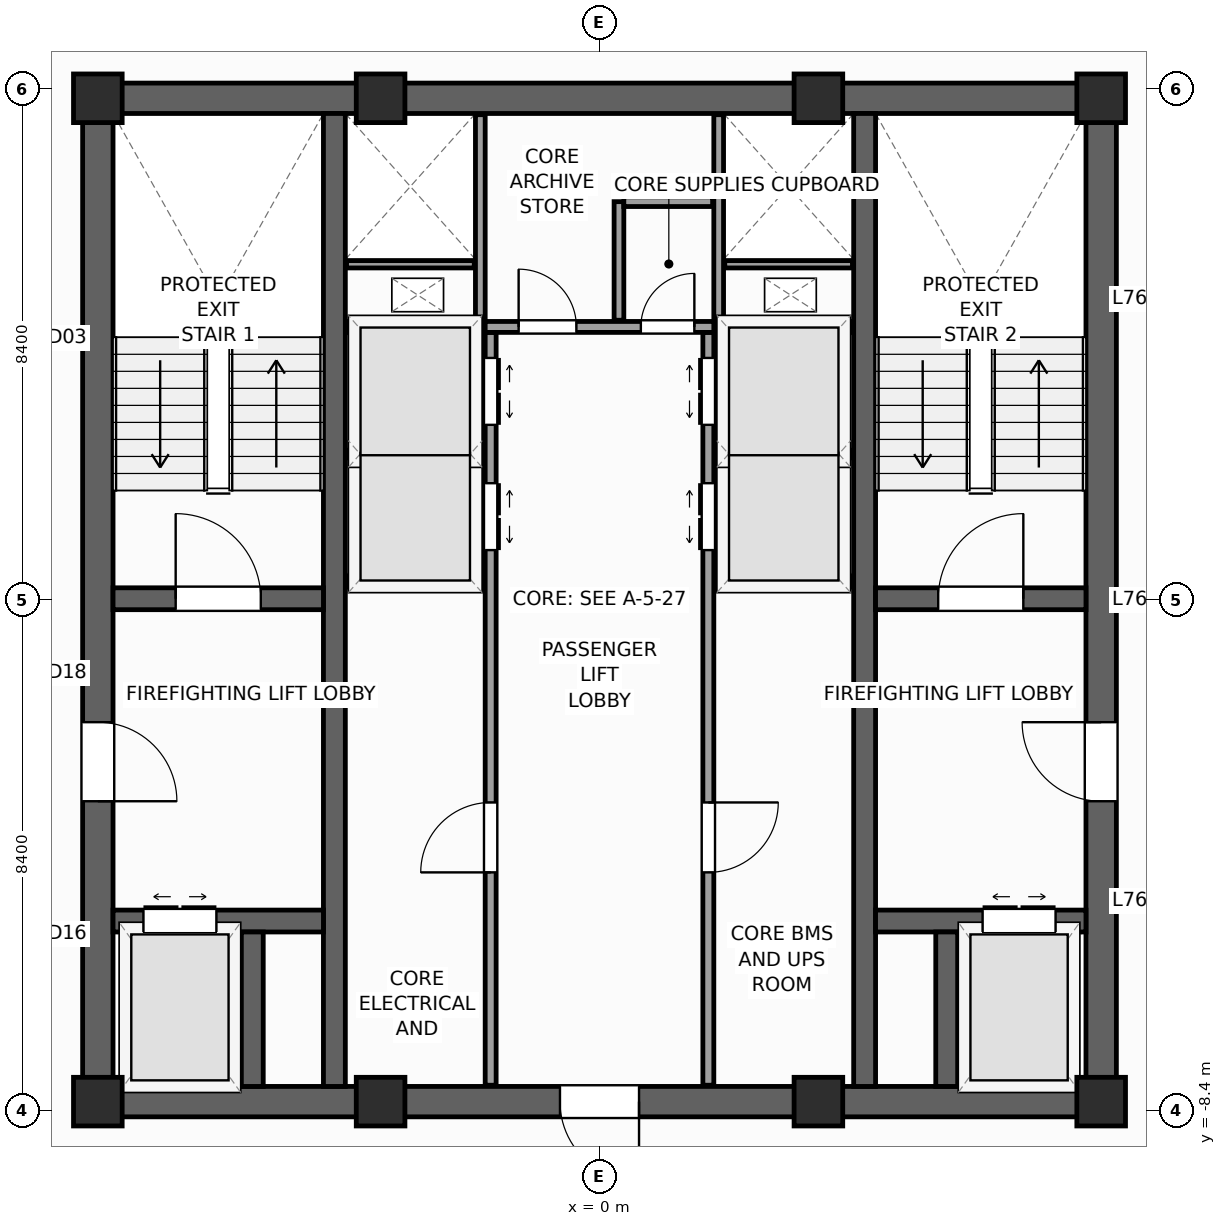
"""IFC4 building model, lengths in metres.
Left out: names, types, materials, properties, quantities, classifications, styles, units other than length and angle.
Written with IfcOpenShell. Run it as: python <this file> out.ifc"""

import sys

from ifc_helpers import new_model, si_unit, direction, frame, frame_2d, origin, origin_2d, place, context, subcontext, project, spatial, rectangle, extrude, source, transform, mapped, element, fill, save


model = new_model("IFC4")
c1 = context("Model", 3, precision=1e-05, world=origin(), true_north=direction((0.0, 1.0)))
c2 = subcontext(c1, "Body", "Model", "MODEL_VIEW")
j1 = project(units=[si_unit("LENGTHUNIT", "METRE"), si_unit("PLANEANGLEUNIT", "RADIAN")], contexts=[c1])
p1 = place(None, origin())
s1 = spatial("IfcSite", under=j1, at=p1, CompositionType="ELEMENT")
p2 = place(p1, origin())
s2 = spatial("IfcBuilding", under=s1, at=p2, CompositionType="ELEMENT")
p3 = place(p2, frame((0.0, 0.0, 308.4)))
s3 = spatial("IfcBuildingStorey", under=s2, at=p3, CompositionType="ELEMENT", Elevation=308.4)
p4 = place(p3, frame((-8.5, -8.25, 0.0), z_axis=(0.0, 0.0, 1.0), x_axis=(1.0, 0.0, 0.0)))
e1 = element("IfcWall", 1, at=p4, inside=s3, PredefinedType="SHEAR", context=c2, shape_type="SweptSolid", body=[
    extrude(rectangle(XDim=17.0, YDim=0.5, at=frame_2d((8.5, 0.0))), origin(), (0.0, 0.0, 1.0), 3.6),
])
p5 = place(p4, frame((7.85, 0.0, 0.0)))
e2 = element("IfcOpeningElement", 2, at=p5, cuts=e1, PredefinedType="OPENING", context=c2, shape_type="SweptSolid", body=[
    extrude(rectangle(XDim=1.3, YDim=2.2, at=frame_2d((0.65, 1.1))), frame((0.0, 0.26, 0.0), z_axis=(0.0, -1.0, 0.0), x_axis=(1.0, 0.0, 0.0)), (0.0, 0.0, 1.0), 0.52),
])
p6 = place(p3, frame((-8.5, 8.25, 0.0), z_axis=(0.0, 0.0, 1.0), x_axis=(1.0, 0.0, 0.0)))
e3 = element("IfcWall", 3, at=p6, inside=s3, PredefinedType="SHEAR", context=c2, shape_type="SweptSolid", body=[
    extrude(rectangle(XDim=17.0, YDim=0.5, at=frame_2d((8.5, 0.0))), origin(), (0.0, 0.0, 1.0), 3.6),
])
p7 = place(p3, frame((-8.25, -8.0, 0.0), z_axis=(0.0, 0.0, 1.0), x_axis=(0.0, 1.0, 0.0)))
e4 = element("IfcWall", 4, at=p7, inside=s3, PredefinedType="SHEAR", context=c2, shape_type="SweptSolid", body=[
    extrude(rectangle(XDim=16.0, YDim=0.5, at=frame_2d((8.0, 0.0))), origin(), (0.0, 0.0, 1.0), 3.6),
])
p8 = place(p7, frame((4.69, 0.0, 0.0)))
e5 = element("IfcOpeningElement", 5, at=p8, cuts=e4, PredefinedType="OPENING", context=c2, shape_type="SweptSolid", body=[
    extrude(rectangle(XDim=1.3, YDim=2.2, at=frame_2d((0.65, 1.1))), frame((0.0, 0.26, 0.0), z_axis=(0.0, -1.0, 0.0), x_axis=(1.0, 0.0, 0.0)), (0.0, 0.0, 1.0), 0.52),
])
p9 = place(p3, frame((8.25, -8.0, 0.0), z_axis=(0.0, 0.0, 1.0), x_axis=(0.0, 1.0, 0.0)))
e6 = element("IfcWall", 6, at=p9, inside=s3, PredefinedType="SHEAR", context=c2, shape_type="SweptSolid", body=[
    extrude(rectangle(XDim=16.0, YDim=0.5, at=frame_2d((8.0, 0.0))), origin(), (0.0, 0.0, 1.0), 3.6),
])
p10 = place(p9, frame((4.69, 0.0, 0.0)))
e7 = element("IfcOpeningElement", 7, at=p10, cuts=e6, PredefinedType="OPENING", context=c2, shape_type="SweptSolid", body=[
    extrude(rectangle(XDim=1.3, YDim=2.2, at=frame_2d((0.65, 1.1))), frame((0.0, 0.26, 0.0), z_axis=(0.0, -1.0, 0.0), x_axis=(1.0, 0.0, 0.0)), (0.0, 0.0, 1.0), 0.52),
])
for number, where, z_axis, x_axis in (
    (8, (-4.36, -8.0, 0.0), (0.0, 0.0, 1.0), (0.0, 1.0, 0.0)),
    (9, (4.36, -8.0, 0.0), (0.0, 0.0, 1.0), (0.0, 1.0, 0.0)),
):
    element("IfcWall", number, at=place(p3, frame(where, z_axis=z_axis, x_axis=x_axis)), inside=s3, PredefinedType="SHEAR", context=c2, shape_type="SweptSolid", body=[
        extrude(rectangle(XDim=16.0, YDim=0.36, at=frame_2d((8.0, 0.0))), origin(), (0.0, 0.0, 1.0), 3.6),
    ])
p11 = place(p3, frame((-8.0, 0.02, 0.0), z_axis=(0.0, 0.0, 1.0), x_axis=(1.0, 0.0, 0.0)))
e10 = element("IfcWall", 10, at=p11, inside=s3, PredefinedType="SHEAR", context=c2, shape_type="SweptSolid", body=[
    extrude(rectangle(XDim=3.46, YDim=0.36, at=frame_2d((1.73, 0.0))), origin(), (0.0, 0.0, 1.0), 3.6),
])
p12 = place(p11, frame((1.03, 0.0, 0.0)))
e11 = element("IfcOpeningElement", 11, at=p12, cuts=e10, PredefinedType="OPENING", context=c2, shape_type="SweptSolid", body=[
    extrude(rectangle(XDim=1.4, YDim=2.2, at=frame_2d((0.7, 1.1))), frame((0.0, 0.19, 0.0), z_axis=(0.0, -1.0, 0.0), x_axis=(1.0, 0.0, 0.0)), (0.0, 0.0, 1.0), 0.38),
])
p13 = place(p3, frame((4.54, 0.02, 0.0), z_axis=(0.0, 0.0, 1.0), x_axis=(1.0, 0.0, 0.0)))
e12 = element("IfcWall", 12, at=p13, inside=s3, PredefinedType="SHEAR", context=c2, shape_type="SweptSolid", body=[
    extrude(rectangle(XDim=3.46, YDim=0.36, at=frame_2d((1.73, 0.0))), origin(), (0.0, 0.0, 1.0), 3.6),
])
p14 = place(p13, frame((1.03, 0.0, 0.0)))
e13 = element("IfcOpeningElement", 13, at=p14, cuts=e12, PredefinedType="OPENING", context=c2, shape_type="SweptSolid", body=[
    extrude(rectangle(XDim=1.4, YDim=2.2, at=frame_2d((0.7, 1.1))), frame((0.0, 0.19, 0.0), z_axis=(0.0, -1.0, 0.0), x_axis=(1.0, 0.0, 0.0)), (0.0, 0.0, 1.0), 0.38),
])
p15 = place(p3, frame((-8.0, -5.28, 0.0), z_axis=(0.0, 0.0, 1.0), x_axis=(1.0, 0.0, 0.0)))
e14 = element("IfcWall", 14, at=p15, inside=s3, PredefinedType="SHEAR", context=c2, shape_type="SweptSolid", body=[
    extrude(rectangle(XDim=3.46, YDim=0.36, at=frame_2d((1.73, 0.0))), origin(), (0.0, 0.0, 1.0), 3.6),
])
p16 = place(p15, frame((0.5, 0.0, 0.0)))
e15 = element("IfcOpeningElement", 15, at=p16, cuts=e14, PredefinedType="OPENING", context=c2, shape_type="SweptSolid", body=[
    extrude(rectangle(XDim=1.2, YDim=2.25, at=frame_2d((0.6, 1.125))), frame((0.0, 0.19, 0.0), z_axis=(0.0, -1.0, 0.0), x_axis=(1.0, 0.0, 0.0)), (0.0, 0.0, 1.0), 0.38),
])
p17 = place(p3, frame((4.54, -5.28, 0.0), z_axis=(0.0, 0.0, 1.0), x_axis=(1.0, 0.0, 0.0)))
e16 = element("IfcWall", 16, at=p17, inside=s3, PredefinedType="SHEAR", context=c2, shape_type="SweptSolid", body=[
    extrude(rectangle(XDim=3.46, YDim=0.36, at=frame_2d((1.73, 0.0))), origin(), (0.0, 0.0, 1.0), 3.6),
])
p18 = place(p17, frame((1.76, 0.0, 0.0)))
e17 = element("IfcOpeningElement", 17, at=p18, cuts=e16, PredefinedType="OPENING", context=c2, shape_type="SweptSolid", body=[
    extrude(rectangle(XDim=1.2, YDim=2.25, at=frame_2d((0.6, 1.125))), frame((0.0, 0.19, 0.0), z_axis=(0.0, -1.0, 0.0), x_axis=(1.0, 0.0, 0.0)), (0.0, 0.0, 1.0), 0.38),
])
for number, where, z_axis, x_axis in (
    (18, (-5.71, -8.0, 0.0), (0.0, 0.0, 1.0), (0.0, 1.0, 0.0)),
    (19, (5.71, -8.0, 0.0), (0.0, 0.0, 1.0), (0.0, 1.0, 0.0)),
):
    element("IfcWall", number, at=place(p3, frame(where, z_axis=z_axis, x_axis=x_axis)), inside=s3, PredefinedType="SHEAR", context=c2, shape_type="SweptSolid", body=[
        extrude(rectangle(XDim=2.54, YDim=0.36, at=frame_2d((1.27, 0.0))), origin(), (0.0, 0.0, 1.0), 3.6),
    ])
m1 = source(origin(), c2, "Body", "SweptSolid", [
    extrude(rectangle(XDim=0.8, YDim=0.8, at=origin_2d()), origin(), (0.0, 0.0, 1.0), 3.6),
])
for number, where, z_axis, x_axis in (
    (20, (-8.25, -8.25, 0.0), (0.0, 0.0, 1.0), (1.0, 0.0, 0.0)),
    (21, (8.25, -8.25, 0.0), (0.0, 0.0, 1.0), (1.0, 0.0, 0.0)),
    (22, (8.25, 8.25, 0.0), (0.0, 0.0, 1.0), (1.0, 0.0, 0.0)),
    (23, (-8.25, 8.25, 0.0), (0.0, 0.0, 1.0), (1.0, 0.0, 0.0)),
    (24, (-3.6, -8.25, 0.0), (0.0, 0.0, 1.0), (1.0, 0.0, 0.0)),
    (25, (3.6, -8.25, 0.0), (0.0, 0.0, 1.0), (1.0, 0.0, 0.0)),
    (26, (-3.6, 8.25, 0.0), (0.0, 0.0, 1.0), (1.0, 0.0, 0.0)),
    (27, (3.6, 8.25, 0.0), (0.0, 0.0, 1.0), (1.0, 0.0, 0.0)),
):
    element("IfcColumn", number, at=place(p3, frame(where, z_axis=z_axis, x_axis=x_axis)), inside=s3, PredefinedType="PILASTER", context=c2, shape_type="MappedRepresentation", body=[
        mapped(m1, transform((0.0, 0.0, 0.0), scale=1.0)),
    ])
p19 = place(p3, frame((-1.79, -7.98, 0.0), z_axis=(0.0, 0.0, 1.0), x_axis=(0.0, 1.0, 0.0)))
e28 = element("IfcWall", 28, at=p19, inside=s3, PredefinedType="PARTITIONING", context=c2, shape_type="SweptSolid", body=[
    extrude(rectangle(XDim=12.38, YDim=0.18, at=frame_2d((6.19, 0.0))), origin(), (0.0, 0.0, 1.0), 3.35),
])
p20 = place(p19, frame((8.8, 0.0, 0.0)))
e29 = element("IfcOpeningElement", 29, at=p20, cuts=e28, PredefinedType="OPENING", context=c2, shape_type="SweptSolid", body=[
    extrude(rectangle(XDim=1.1, YDim=2.2, at=frame_2d((0.55, 1.1))), frame((0.0, 0.1, 0.0), z_axis=(0.0, -1.0, 0.0), x_axis=(1.0, 0.0, 0.0)), (0.0, 0.0, 1.0), 0.2),
])
p21 = place(p19, frame((10.86, 0.0, 0.0)))
e30 = element("IfcOpeningElement", 30, at=p21, cuts=e28, PredefinedType="OPENING", context=c2, shape_type="SweptSolid", body=[
    extrude(rectangle(XDim=1.1, YDim=2.2, at=frame_2d((0.55, 1.1))), frame((0.0, 0.1, 0.0), z_axis=(0.0, -1.0, 0.0), x_axis=(1.0, 0.0, 0.0)), (0.0, 0.0, 1.0), 0.2),
])
p22 = place(p19, frame((3.5, 0.0, 0.0)))
e31 = element("IfcOpeningElement", 31, at=p22, cuts=e28, PredefinedType="OPENING", context=c2, shape_type="SweptSolid", body=[
    extrude(rectangle(XDim=1.15, YDim=2.25, at=frame_2d((0.575, 1.125))), frame((0.0, 0.1, 0.0), z_axis=(0.0, -1.0, 0.0), x_axis=(1.0, 0.0, 0.0)), (0.0, 0.0, 1.0), 0.2),
])
p23 = place(p3, frame((1.79, -7.98, 0.0), z_axis=(0.0, 0.0, 1.0), x_axis=(0.0, 1.0, 0.0)))
e32 = element("IfcWall", 32, at=p23, inside=s3, PredefinedType="PARTITIONING", context=c2, shape_type="SweptSolid", body=[
    extrude(rectangle(XDim=12.38, YDim=0.18, at=frame_2d((6.19, 0.0))), origin(), (0.0, 0.0, 1.0), 3.35),
])
p24 = place(p23, frame((8.8, 0.0, 0.0)))
e33 = element("IfcOpeningElement", 33, at=p24, cuts=e32, PredefinedType="OPENING", context=c2, shape_type="SweptSolid", body=[
    extrude(rectangle(XDim=1.1, YDim=2.2, at=frame_2d((0.55, 1.1))), frame((0.0, 0.1, 0.0), z_axis=(0.0, -1.0, 0.0), x_axis=(1.0, 0.0, 0.0)), (0.0, 0.0, 1.0), 0.2),
])
p25 = place(p23, frame((10.86, 0.0, 0.0)))
e34 = element("IfcOpeningElement", 34, at=p25, cuts=e32, PredefinedType="OPENING", context=c2, shape_type="SweptSolid", body=[
    extrude(rectangle(XDim=1.1, YDim=2.2, at=frame_2d((0.55, 1.1))), frame((0.0, 0.1, 0.0), z_axis=(0.0, -1.0, 0.0), x_axis=(1.0, 0.0, 0.0)), (0.0, 0.0, 1.0), 0.2),
])
p26 = place(p23, frame((3.5, 0.0, 0.0)))
e35 = element("IfcOpeningElement", 35, at=p26, cuts=e32, PredefinedType="OPENING", context=c2, shape_type="SweptSolid", body=[
    extrude(rectangle(XDim=1.15, YDim=2.25, at=frame_2d((0.575, 1.125))), frame((0.0, 0.1, 0.0), z_axis=(0.0, -1.0, 0.0), x_axis=(1.0, 0.0, 0.0)), (0.0, 0.0, 1.0), 0.2),
])
p27 = place(p3, frame((-1.88, 4.49, 0.0), z_axis=(0.0, 0.0, 1.0), x_axis=(1.0, 0.0, 0.0)))
e36 = element("IfcWall", 36, at=p27, inside=s3, PredefinedType="PARTITIONING", context=c2, shape_type="SweptSolid", body=[
    extrude(rectangle(XDim=3.76, YDim=0.18, at=frame_2d((1.88, 0.0))), origin(), (0.0, 0.0, 1.0), 3.35),
])
p28 = place(p27, frame((0.55, 0.0, 0.0)))
e37 = element("IfcOpeningElement", 37, at=p28, cuts=e36, PredefinedType="OPENING", context=c2, shape_type="SweptSolid", body=[
    extrude(rectangle(XDim=0.95, YDim=2.1, at=frame_2d((0.475, 1.05))), frame((0.0, 0.1, 0.0), z_axis=(0.0, -1.0, 0.0), x_axis=(1.0, 0.0, 0.0)), (0.0, 0.0, 1.0), 0.2),
])
p29 = place(p27, frame((2.56, 0.0, 0.0)))
e38 = element("IfcOpeningElement", 38, at=p29, cuts=e36, PredefinedType="OPENING", context=c2, shape_type="SweptSolid", body=[
    extrude(rectangle(XDim=0.88, YDim=2.1, at=frame_2d((0.44, 1.05))), frame((0.0, 0.1, 0.0), z_axis=(0.0, -1.0, 0.0), x_axis=(1.0, 0.0, 0.0)), (0.0, 0.0, 1.0), 0.2),
])
for number, where, z_axis, x_axis in (
    (39, (-4.17, 0.3, 0.0), (0.0, 0.0, 1.0), (1.0, 0.0, 0.0)),
    (40, (1.89, 0.3, 0.0), (0.0, 0.0, 1.0), (1.0, 0.0, 0.0)),
    (41, (-4.17, 4.49, 0.0), (0.0, 0.0, 1.0), (1.0, 0.0, 0.0)),
    (42, (1.89, 4.49, 0.0), (0.0, 0.0, 1.0), (1.0, 0.0, 0.0)),
):
    element("IfcWall", number, at=place(p3, frame(where, z_axis=z_axis, x_axis=x_axis)), inside=s3, PredefinedType="PARTITIONING", context=c2, shape_type="SweptSolid", body=[
        extrude(rectangle(XDim=2.28, YDim=0.18, at=frame_2d((1.14, 0.0))), origin(), (0.0, 0.0, 1.0), 3.35),
    ])
for number, where, z_axis, x_axis in (
    (43, (-4.16, 2.4, 0.0), (0.0, 0.0, 1.0), (1.0, 0.0, 0.0)),
    (44, (1.9, 2.4, 0.0), (0.0, 0.0, 1.0), (1.0, 0.0, 0.0)),
):
    element("IfcWall", number, at=place(p3, frame(where, z_axis=z_axis, x_axis=x_axis)), inside=s3, PredefinedType="PARTITIONING", context=c2, shape_type="SweptSolid", body=[
        extrude(rectangle(XDim=2.26, YDim=0.12, at=frame_2d((1.13, 0.0))), origin(), (0.0, 0.0, 1.0), 3.35),
    ])
for number, where, z_axis, x_axis in (
    (45, (-1.96, 4.58, 0.0), (0.0, 0.0, 1.0), (0.0, 1.0, 0.0)),
    (46, (1.96, 4.58, 0.0), (0.0, 0.0, 1.0), (0.0, 1.0, 0.0)),
):
    element("IfcWall", number, at=place(p3, frame(where, z_axis=z_axis, x_axis=x_axis)), inside=s3, PredefinedType="PARTITIONING", context=c2, shape_type="SweptSolid", body=[
        extrude(rectangle(XDim=3.4, YDim=0.16, at=frame_2d((1.7, 0.0))), origin(), (0.0, 0.0, 1.0), 3.35),
    ])
for number, where, z_axis, x_axis in (
    (47, (-4.16, 5.52, 0.0), (0.0, 0.0, 1.0), (1.0, 0.0, 0.0)),
    (48, (2.06, 5.52, 0.0), (0.0, 0.0, 1.0), (1.0, 0.0, 0.0)),
):
    element("IfcWall", number, at=place(p3, frame(where, z_axis=z_axis, x_axis=x_axis)), inside=s3, PredefinedType="PARTITIONING", context=c2, shape_type="SweptSolid", body=[
        extrude(rectangle(XDim=2.1, YDim=0.12, at=frame_2d((1.05, 0.0))), origin(), (0.0, 0.0, 1.0), 3.35),
    ])
p30 = place(p3, frame((0.32, 4.6, 0.0), z_axis=(0.0, 0.0, 1.0), x_axis=(0.0, 1.0, 0.0)))
e49 = element("IfcWall", 49, at=p30, inside=s3, PredefinedType="PARTITIONING", context=c2, shape_type="SweptSolid", body=[
    extrude(rectangle(XDim=1.95, YDim=0.16, at=frame_2d((0.975, 0.0))), origin(), (0.0, 0.0, 1.0), 3.35),
])
p31 = place(p3, frame((0.4, 6.55, 0.0), z_axis=(0.0, 0.0, 1.0), x_axis=(1.0, 0.0, 0.0)))
e50 = element("IfcWall", 50, at=p31, inside=s3, PredefinedType="PARTITIONING", context=c2, shape_type="SweptSolid", body=[
    extrude(rectangle(XDim=1.46, YDim=0.16, at=frame_2d((0.73, 0.0))), origin(), (0.0, 0.0, 1.0), 3.35),
])
m2 = source(origin(), c2, "Body", "SweptSolid", [
    extrude(rectangle(XDim=1.4, YDim=2.2, at=frame_2d((0.7, 1.1))), frame((0.0, 0.025, 0.0), z_axis=(0.0, -1.0, 0.0), x_axis=(1.0, 0.0, 0.0)), (0.0, 0.0, 1.0), 0.05),
])
p32 = place(p12, origin())
e51 = element("IfcDoor", 51, at=p32, inside=s3, OperationType="SINGLE_SWING_LEFT", PredefinedType="DOOR", context=c2, shape_type="MappedRepresentation", body=[
    mapped(m2, transform((0.0, 0.0, 0.0), scale=1.0)),
])
fill(e11, e51)
p33 = place(p14, origin())
e52 = element("IfcDoor", 52, at=p33, inside=s3, OperationType="SINGLE_SWING_RIGHT", PredefinedType="DOOR", context=c2, shape_type="MappedRepresentation", body=[
    mapped(m2, transform((0.0, 0.0, 0.0), scale=1.0)),
])
fill(e13, e52)
m3 = source(origin(), c2, "Body", "SweptSolid", [
    extrude(rectangle(XDim=1.3, YDim=2.2, at=frame_2d((0.65, 1.1))), frame((0.0, 0.025, 0.0), z_axis=(0.0, -1.0, 0.0), x_axis=(1.0, 0.0, 0.0)), (0.0, 0.0, 1.0), 0.05),
])
p34 = place(p8, frame((1.3, 0.0, 0.0), z_axis=(0.0, 0.0, 1.0), x_axis=(-1.0, 0.0, 0.0)))
e53 = element("IfcDoor", 53, at=p34, inside=s3, OperationType="SINGLE_SWING_LEFT", PredefinedType="DOOR", context=c2, shape_type="MappedRepresentation", body=[
    mapped(m3, transform((0.0, 0.0, 0.0), scale=1.0)),
])
fill(e5, e53)
p35 = place(p10, origin())
e54 = element("IfcDoor", 54, at=p35, inside=s3, OperationType="SINGLE_SWING_RIGHT", PredefinedType="DOOR", context=c2, shape_type="MappedRepresentation", body=[
    mapped(m3, transform((0.0, 0.0, 0.0), scale=1.0)),
])
fill(e7, e54)
p36 = place(p5, frame((1.3, 0.0, 0.0), z_axis=(0.0, 0.0, 1.0), x_axis=(-1.0, 0.0, 0.0)))
e55 = element("IfcDoor", 55, at=p36, inside=s3, OperationType="SINGLE_SWING_RIGHT", PredefinedType="DOOR", context=c2, shape_type="MappedRepresentation", body=[
    mapped(m3, transform((0.0, 0.0, 0.0), scale=1.0)),
])
fill(e2, e55)
m4 = source(origin(), c2, "Body", "SweptSolid", [
    extrude(rectangle(XDim=1.2, YDim=2.25, at=frame_2d((0.6, 1.125))), frame((0.0, 0.025, 0.0), z_axis=(0.0, -1.0, 0.0), x_axis=(1.0, 0.0, 0.0)), (0.0, 0.0, 1.0), 0.05),
])
p37 = place(p16, origin())
e56 = element("IfcDoor", 56, at=p37, inside=s3, OperationType="DOUBLE_DOOR_SLIDING", PredefinedType="DOOR", context=c2, shape_type="MappedRepresentation", body=[
    mapped(m4, transform((0.0, 0.0, 0.0), scale=1.0)),
])
fill(e15, e56)
p38 = place(p18, origin())
e57 = element("IfcDoor", 57, at=p38, inside=s3, OperationType="DOUBLE_DOOR_SLIDING", PredefinedType="DOOR", context=c2, shape_type="MappedRepresentation", body=[
    mapped(m4, transform((0.0, 0.0, 0.0), scale=1.0)),
])
fill(e17, e57)
m5 = source(origin(), c2, "Body", "SweptSolid", [
    extrude(rectangle(XDim=1.1, YDim=2.2, at=frame_2d((0.55, 1.1))), frame((0.0, 0.025, 0.0), z_axis=(0.0, -1.0, 0.0), x_axis=(1.0, 0.0, 0.0)), (0.0, 0.0, 1.0), 0.05),
])
p39 = place(p20, frame((1.1, 0.0, 0.0), z_axis=(0.0, 0.0, 1.0), x_axis=(-1.0, 0.0, 0.0)))
e58 = element("IfcDoor", 58, at=p39, inside=s3, OperationType="DOUBLE_DOOR_SLIDING", PredefinedType="DOOR", context=c2, shape_type="MappedRepresentation", body=[
    mapped(m5, transform((0.0, 0.0, 0.0), scale=1.0)),
])
fill(e29, e58)
p40 = place(p21, frame((1.1, 0.0, 0.0), z_axis=(0.0, 0.0, 1.0), x_axis=(-1.0, 0.0, 0.0)))
e59 = element("IfcDoor", 59, at=p40, inside=s3, OperationType="DOUBLE_DOOR_SLIDING", PredefinedType="DOOR", context=c2, shape_type="MappedRepresentation", body=[
    mapped(m5, transform((0.0, 0.0, 0.0), scale=1.0)),
])
fill(e30, e59)
p41 = place(p24, origin())
e60 = element("IfcDoor", 60, at=p41, inside=s3, OperationType="DOUBLE_DOOR_SLIDING", PredefinedType="DOOR", context=c2, shape_type="MappedRepresentation", body=[
    mapped(m5, transform((0.0, 0.0, 0.0), scale=1.0)),
])
fill(e33, e60)
p42 = place(p25, origin())
e61 = element("IfcDoor", 61, at=p42, inside=s3, OperationType="DOUBLE_DOOR_SLIDING", PredefinedType="DOOR", context=c2, shape_type="MappedRepresentation", body=[
    mapped(m5, transform((0.0, 0.0, 0.0), scale=1.0)),
])
fill(e34, e61)
m6 = source(origin(), c2, "Body", "SweptSolid", [
    extrude(rectangle(XDim=1.15, YDim=2.25, at=frame_2d((0.575, 1.125))), frame((0.0, 0.025, 0.0), z_axis=(0.0, -1.0, 0.0), x_axis=(1.0, 0.0, 0.0)), (0.0, 0.0, 1.0), 0.05),
])
p43 = place(p22, origin())
e62 = element("IfcDoor", 62, at=p43, inside=s3, OperationType="SINGLE_SWING_LEFT", PredefinedType="DOOR", context=c2, shape_type="MappedRepresentation", body=[
    mapped(m6, transform((0.0, 0.0, 0.0), scale=1.0)),
])
fill(e31, e62)
p44 = place(p26, frame((1.15, 0.0, 0.0), z_axis=(0.0, 0.0, 1.0), x_axis=(-1.0, 0.0, 0.0)))
e63 = element("IfcDoor", 63, at=p44, inside=s3, OperationType="SINGLE_SWING_RIGHT", PredefinedType="DOOR", context=c2, shape_type="MappedRepresentation", body=[
    mapped(m6, transform((0.0, 0.0, 0.0), scale=1.0)),
])
fill(e35, e63)
m7 = source(origin(), c2, "Body", "SweptSolid", [
    extrude(rectangle(XDim=0.95, YDim=2.1, at=frame_2d((0.475, 1.05))), frame((0.0, 0.025, 0.0), z_axis=(0.0, -1.0, 0.0), x_axis=(1.0, 0.0, 0.0)), (0.0, 0.0, 1.0), 0.05),
])
p45 = place(p28, origin())
e64 = element("IfcDoor", 64, at=p45, inside=s3, OperationType="SINGLE_SWING_LEFT", PredefinedType="DOOR", context=c2, shape_type="MappedRepresentation", body=[
    mapped(m7, transform((0.0, 0.0, 0.0), scale=1.0)),
])
fill(e37, e64)
m8 = source(origin(), c2, "Body", "SweptSolid", [
    extrude(rectangle(XDim=0.88, YDim=2.1, at=frame_2d((0.44, 1.05))), frame((0.0, 0.025, 0.0), z_axis=(0.0, -1.0, 0.0), x_axis=(1.0, 0.0, 0.0)), (0.0, 0.0, 1.0), 0.05),
])
p46 = place(p29, origin())
e65 = element("IfcDoor", 65, at=p46, inside=s3, OperationType="SINGLE_SWING_RIGHT", PredefinedType="DOOR", context=c2, shape_type="MappedRepresentation", body=[
    mapped(m8, transform((0.0, 0.0, 0.0), scale=1.0)),
])
fill(e38, e65)
save(model, sys.argv[1])
